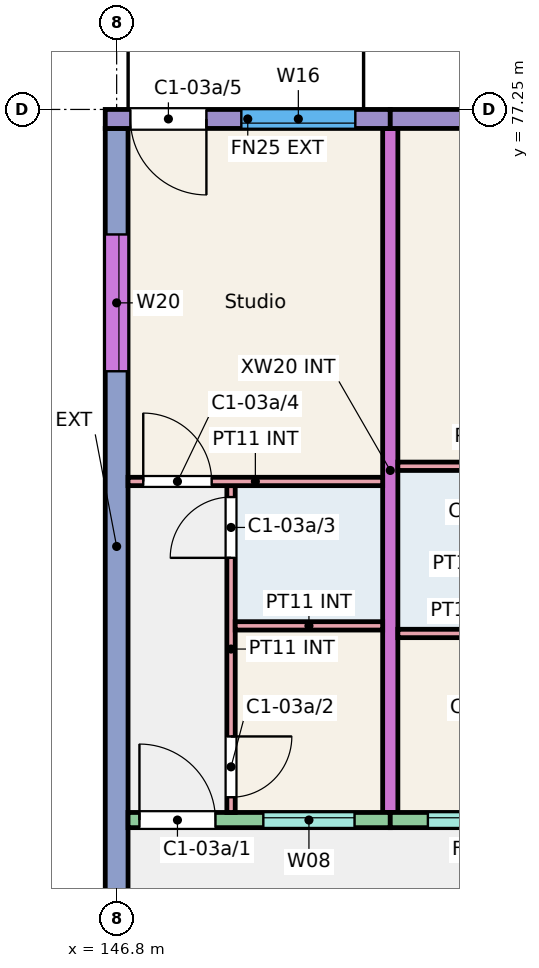
"""IFC4 building model, lengths in metres.
Left out: names, types, materials, properties, quantities, classifications, styles, units other than length and angle.
Written with IfcOpenShell. Run it as: python <this file> out.ifc"""

import sys

from ifc_helpers import new_model, si_unit, direction, frame, frame_2d, origin, place, context, subcontext, project, spatial, rectangle, extrude, element, fill, save


model = new_model("IFC4")
c1 = context("Model", 3, precision=1e-05, world=origin(), true_north=direction((0.0, 1.0)))
c2 = subcontext(c1, "Body", "Model", "MODEL_VIEW")
j1 = project(units=[si_unit("LENGTHUNIT", "METRE"), si_unit("PLANEANGLEUNIT", "RADIAN")], contexts=[c1])
p1 = place(None, origin())
s1 = spatial("IfcSite", under=j1, at=p1, CompositionType="ELEMENT")
p2 = place(p1, origin())
s2 = spatial("IfcBuilding", under=s1, at=p2, CompositionType="ELEMENT")
p3 = place(p2, frame((0.0, 0.0, 9.0)))
s3 = spatial("IfcBuildingStorey", under=s2, at=p3, CompositionType="ELEMENT", Elevation=9.0)
p4 = place(p3, frame((146.8, 66.0, 0.0), z_axis=(0.0, 0.0, 1.0), x_axis=(0.0, 1.0, 0.0)))
e1 = element("IfcWall", 1, at=p4, inside=s3, PredefinedType="SHEAR", context=c2, shape_type="SweptSolid", body=[
    extrude(rectangle(XDim=11.0, YDim=0.3, at=frame_2d((5.5, 0.0))), origin(), (0.0, 0.0, 1.0), 3.0),
])
p5 = place(p4, frame((7.805, 0.0, 0.9)))
e2 = element("IfcOpeningElement", 2, at=p5, cuts=e1, PredefinedType="OPENING", context=c2, shape_type="SweptSolid", body=[
    extrude(rectangle(XDim=1.8, YDim=1.5, at=frame_2d((0.9, 0.75))), frame((0.0, 0.16, 0.0), z_axis=(0.0, -1.0, 0.0), x_axis=(1.0, 0.0, 0.0)), (0.0, 0.0, 1.0), 0.32),
])
p6 = place(p3, frame((150.4, 68.0, 0.0), z_axis=(0.0, 0.0, 1.0), x_axis=(0.0, 1.0, 0.0)))
e3 = element("IfcWall", 3, at=p6, inside=s3, PredefinedType="SHEAR", context=c2, shape_type="SweptSolid", body=[
    extrude(rectangle(XDim=9.0, YDim=0.2, at=frame_2d((4.5, 0.0))), origin(), (0.0, 0.0, 1.0), 3.0),
])
p7 = place(p3, frame((146.65, 77.125, 0.0), z_axis=(0.0, 0.0, 1.0), x_axis=(1.0, 0.0, 0.0)))
e4 = element("IfcWall", 4, at=p7, inside=s3, PredefinedType="SOLIDWALL", context=c2, shape_type="SweptSolid", body=[
    extrude(rectangle(XDim=3.75, YDim=0.25, at=frame_2d((1.875, 0.0))), origin(), (0.0, 0.0, 1.0), 3.0),
])
p8 = place(p7, frame((1.791, 0.0, 0.9)))
e5 = element("IfcOpeningElement", 5, at=p8, cuts=e4, PredefinedType="OPENING", context=c2, shape_type="SweptSolid", body=[
    extrude(rectangle(XDim=1.5, YDim=1.5, at=frame_2d((0.75, 0.75))), frame((0.0, 0.135, 0.0), z_axis=(0.0, -1.0, 0.0), x_axis=(1.0, 0.0, 0.0)), (0.0, 0.0, 1.0), 0.27),
])
p9 = place(p7, frame((0.331, 0.0, 0.0)))
e6 = element("IfcOpeningElement", 6, at=p9, cuts=e4, PredefinedType="OPENING", context=c2, shape_type="SweptSolid", body=[
    extrude(rectangle(XDim=1.0, YDim=2.1, at=frame_2d((0.5, 1.05))), frame((0.0, 0.135, 0.0), z_axis=(0.0, -1.0, 0.0), x_axis=(1.0, 0.0, 0.0)), (0.0, 0.0, 1.0), 0.27),
])
p10 = place(p3, frame((146.95, 67.9, 0.0), z_axis=(0.0, 0.0, 1.0), x_axis=(1.0, 0.0, 0.0)))
e7 = element("IfcWall", 7, at=p10, inside=s3, PredefinedType="SOLIDWALL", context=c2, shape_type="SweptSolid", body=[
    extrude(rectangle(XDim=3.45, YDim=0.2, at=frame_2d((1.725, 0.0))), origin(), (0.0, 0.0, 1.0), 3.0),
])
p11 = place(p10, frame((1.78, 0.0, 1.1)))
e8 = element("IfcOpeningElement", 8, at=p11, cuts=e7, PredefinedType="OPENING", context=c2, shape_type="SweptSolid", body=[
    extrude(rectangle(XDim=1.2, YDim=1.3, at=frame_2d((0.6, 0.65))), frame((0.0, 0.11, 0.0), z_axis=(0.0, -1.0, 0.0), x_axis=(1.0, 0.0, 0.0)), (0.0, 0.0, 1.0), 0.22),
])
p12 = place(p10, frame((0.15, 0.0, 0.0)))
e9 = element("IfcOpeningElement", 9, at=p12, cuts=e7, PredefinedType="OPENING", context=c2, shape_type="SweptSolid", body=[
    extrude(rectangle(XDim=1.0, YDim=2.1, at=frame_2d((0.5, 1.05))), frame((0.0, 0.11, 0.0), z_axis=(0.0, -1.0, 0.0), x_axis=(1.0, 0.0, 0.0)), (0.0, 0.0, 1.0), 0.22),
])
p13 = place(p3, frame((150.4, 77.125, 0.0), z_axis=(0.0, 0.0, 1.0), x_axis=(1.0, 0.0, 0.0)))
e10 = element("IfcWall", 10, at=p13, inside=s3, PredefinedType="SOLIDWALL", context=c2, shape_type="SweptSolid", body=[
    extrude(rectangle(XDim=3.6, YDim=0.25, at=frame_2d((1.8, 0.0))), origin(), (0.0, 0.0, 1.0), 3.0),
])
p14 = place(p13, frame((1.05, 0.0, 0.9)))
e11 = element("IfcOpeningElement", 11, at=p14, cuts=e10, PredefinedType="OPENING", context=c2, shape_type="SweptSolid", body=[
    extrude(rectangle(XDim=1.5, YDim=1.5, at=frame_2d((0.75, 0.75))), frame((0.0, 0.135, 0.0), z_axis=(0.0, -1.0, 0.0), x_axis=(1.0, 0.0, 0.0)), (0.0, 0.0, 1.0), 0.27),
])
p15 = place(p3, frame((150.4, 67.9, 0.0), z_axis=(0.0, 0.0, 1.0), x_axis=(1.0, 0.0, 0.0)))
e12 = element("IfcWall", 12, at=p15, inside=s3, PredefinedType="SOLIDWALL", context=c2, shape_type="SweptSolid", body=[
    extrude(rectangle(XDim=3.6, YDim=0.2, at=frame_2d((1.8, 0.0))), origin(), (0.0, 0.0, 1.0), 3.0),
])
p16 = place(p15, frame((0.495, 0.0, 1.1)))
e13 = element("IfcOpeningElement", 13, at=p16, cuts=e12, PredefinedType="OPENING", context=c2, shape_type="SweptSolid", body=[
    extrude(rectangle(XDim=1.2, YDim=1.3, at=frame_2d((0.6, 0.65))), frame((0.0, 0.11, 0.0), z_axis=(0.0, -1.0, 0.0), x_axis=(1.0, 0.0, 0.0)), (0.0, 0.0, 1.0), 0.22),
])
p17 = place(p15, frame((2.35, 0.0, 0.0)))
e14 = element("IfcOpeningElement", 14, at=p17, cuts=e12, PredefinedType="OPENING", context=c2, shape_type="SweptSolid", body=[
    extrude(rectangle(XDim=1.0, YDim=2.1, at=frame_2d((0.5, 1.05))), frame((0.0, 0.11, 0.0), z_axis=(0.0, -1.0, 0.0), x_axis=(1.0, 0.0, 0.0)), (0.0, 0.0, 1.0), 0.22),
])
p18 = place(p3, frame((148.305, 68.0, 0.0), z_axis=(0.0, 0.0, 1.0), x_axis=(0.0, 1.0, 0.0)))
e15 = element("IfcWall", 15, at=p18, inside=s3, PredefinedType="PARTITIONING", context=c2, shape_type="SweptSolid", body=[
    extrude(rectangle(XDim=4.3, YDim=0.11, at=frame_2d((2.15, 0.0))), origin(), (0.0, 0.0, 1.0), 2.8),
])
p19 = place(p18, frame((0.2, 0.0, 0.0)))
e16 = element("IfcOpeningElement", 16, at=p19, cuts=e15, PredefinedType="OPENING", context=c2, shape_type="SweptSolid", body=[
    extrude(rectangle(XDim=0.8, YDim=2.1, at=frame_2d((0.4, 1.05))), frame((0.0, 0.065, 0.0), z_axis=(0.0, -1.0, 0.0), x_axis=(1.0, 0.0, 0.0)), (0.0, 0.0, 1.0), 0.13),
])
p20 = place(p18, frame((3.35, 0.0, 0.0)))
e17 = element("IfcOpeningElement", 17, at=p20, cuts=e15, PredefinedType="OPENING", context=c2, shape_type="SweptSolid", body=[
    extrude(rectangle(XDim=0.8, YDim=2.1, at=frame_2d((0.4, 1.05))), frame((0.0, 0.065, 0.0), z_axis=(0.0, -1.0, 0.0), x_axis=(1.0, 0.0, 0.0)), (0.0, 0.0, 1.0), 0.13),
])
p21 = place(p3, frame((148.36, 70.455, 0.0), z_axis=(0.0, 0.0, 1.0), x_axis=(1.0, 0.0, 0.0)))
e18 = element("IfcWall", 18, at=p21, inside=s3, PredefinedType="PARTITIONING", context=c2, shape_type="SweptSolid", body=[
    extrude(rectangle(XDim=1.94, YDim=0.11, at=frame_2d((0.97, 0.0))), origin(), (0.0, 0.0, 1.0), 2.8),
])
p22 = place(p3, frame((146.95, 72.355, 0.0), z_axis=(0.0, 0.0, 1.0), x_axis=(1.0, 0.0, 0.0)))
e19 = element("IfcWall", 19, at=p22, inside=s3, PredefinedType="PARTITIONING", context=c2, shape_type="SweptSolid", body=[
    extrude(rectangle(XDim=3.35, YDim=0.11, at=frame_2d((1.675, 0.0))), origin(), (0.0, 0.0, 1.0), 2.8),
])
p23 = place(p22, frame((0.2, 0.0, 0.0)))
e20 = element("IfcOpeningElement", 20, at=p23, cuts=e19, PredefinedType="OPENING", context=c2, shape_type="SweptSolid", body=[
    extrude(rectangle(XDim=0.9, YDim=2.1, at=frame_2d((0.45, 1.05))), frame((0.0, 0.065, 0.0), z_axis=(0.0, -1.0, 0.0), x_axis=(1.0, 0.0, 0.0)), (0.0, 0.0, 1.0), 0.13),
])
p24 = place(p3, frame((150.5, 70.355, 0.0), z_axis=(0.0, 0.0, 1.0), x_axis=(1.0, 0.0, 0.0)))
e21 = element("IfcWall", 21, at=p24, inside=s3, PredefinedType="PARTITIONING", context=c2, shape_type="SweptSolid", body=[
    extrude(rectangle(XDim=1.99, YDim=0.11, at=frame_2d((0.995, 0.0))), origin(), (0.0, 0.0, 1.0), 2.8),
])
p25 = place(p3, frame((150.5, 72.555, 0.0), z_axis=(0.0, 0.0, 1.0), x_axis=(1.0, 0.0, 0.0)))
e22 = element("IfcWall", 22, at=p25, inside=s3, PredefinedType="PARTITIONING", context=c2, shape_type="SweptSolid", body=[
    extrude(rectangle(XDim=3.4, YDim=0.11, at=frame_2d((1.7, 0.0))), origin(), (0.0, 0.0, 1.0), 2.8),
])
p26 = place(p25, frame((2.3, 0.0, 0.0)))
e23 = element("IfcOpeningElement", 23, at=p26, cuts=e22, PredefinedType="OPENING", context=c2, shape_type="SweptSolid", body=[
    extrude(rectangle(XDim=0.9, YDim=2.1, at=frame_2d((0.45, 1.05))), frame((0.0, 0.065, 0.0), z_axis=(0.0, -1.0, 0.0), x_axis=(1.0, 0.0, 0.0)), (0.0, 0.0, 1.0), 0.13),
])
p27 = place(p11, origin())
e24 = element("IfcWindow", 24, at=p27, inside=s3, PartitioningType="SINGLE_PANEL", PredefinedType="WINDOW", context=c2, shape_type="SweptSolid", body=[
    extrude(rectangle(XDim=1.2, YDim=1.3, at=frame_2d((0.6, 0.65))), frame((0.0, 0.06, 0.0), z_axis=(0.0, -1.0, 0.0), x_axis=(1.0, 0.0, 0.0)), (0.0, 0.0, 1.0), 0.06),
])
fill(e8, e24)
p28 = place(p8, origin())
e25 = element("IfcWindow", 25, at=p28, inside=s3, PartitioningType="SINGLE_PANEL", PredefinedType="WINDOW", context=c2, shape_type="SweptSolid", body=[
    extrude(rectangle(XDim=1.5, YDim=1.5, at=frame_2d((0.75, 0.75))), frame((0.0, -0.025, 0.0), z_axis=(0.0, -1.0, 0.0), x_axis=(1.0, 0.0, 0.0)), (0.0, 0.0, 1.0), 0.06),
])
fill(e5, e25)
p29 = place(p5, origin())
e26 = element("IfcWindow", 26, at=p29, inside=s3, PartitioningType="SINGLE_PANEL", PredefinedType="WINDOW", context=c2, shape_type="SweptSolid", body=[
    extrude(rectangle(XDim=1.8, YDim=1.5, at=frame_2d((0.9, 0.75))), frame((0.0, 0.0, 0.0), z_axis=(0.0, -1.0, 0.0), x_axis=(1.0, 0.0, 0.0)), (0.0, 0.0, 1.0), 0.06),
])
fill(e2, e26)
p30 = place(p16, origin())
e27 = element("IfcWindow", 27, at=p30, inside=s3, PartitioningType="SINGLE_PANEL", PredefinedType="WINDOW", context=c2, shape_type="SweptSolid", body=[
    extrude(rectangle(XDim=1.2, YDim=1.3, at=frame_2d((0.6, 0.65))), frame((0.0, 0.06, 0.0), z_axis=(0.0, -1.0, 0.0), x_axis=(1.0, 0.0, 0.0)), (0.0, 0.0, 1.0), 0.06),
])
fill(e13, e27)
p31 = place(p12, origin())
e28 = element("IfcDoor", 28, at=p31, inside=s3, OperationType="SINGLE_SWING_LEFT", PredefinedType="DOOR", context=c2, shape_type="SweptSolid", body=[
    extrude(rectangle(XDim=1.0, YDim=2.1, at=frame_2d((0.5, 1.05))), frame((0.0, 0.025, 0.0), z_axis=(0.0, -1.0, 0.0), x_axis=(1.0, 0.0, 0.0)), (0.0, 0.0, 1.0), 0.05),
])
fill(e9, e28)
p32 = place(p19, origin())
e29 = element("IfcDoor", 29, at=p32, inside=s3, OperationType="SINGLE_SWING_RIGHT", PredefinedType="DOOR", context=c2, shape_type="SweptSolid", body=[
    extrude(rectangle(XDim=0.8, YDim=2.1, at=frame_2d((0.4, 1.05))), frame((0.0, 0.025, 0.0), z_axis=(0.0, -1.0, 0.0), x_axis=(1.0, 0.0, 0.0)), (0.0, 0.0, 1.0), 0.05),
])
fill(e16, e29)
p33 = place(p20, origin())
e30 = element("IfcDoor", 30, at=p33, inside=s3, OperationType="SINGLE_SWING_LEFT", PredefinedType="DOOR", context=c2, shape_type="SweptSolid", body=[
    extrude(rectangle(XDim=0.8, YDim=2.1, at=frame_2d((0.4, 1.05))), frame((0.0, 0.025, 0.0), z_axis=(0.0, -1.0, 0.0), x_axis=(1.0, 0.0, 0.0)), (0.0, 0.0, 1.0), 0.05),
])
fill(e17, e30)
p34 = place(p23, origin())
e31 = element("IfcDoor", 31, at=p34, inside=s3, OperationType="SINGLE_SWING_LEFT", PredefinedType="DOOR", context=c2, shape_type="SweptSolid", body=[
    extrude(rectangle(XDim=0.9, YDim=2.1, at=frame_2d((0.45, 1.05))), frame((0.0, 0.025, 0.0), z_axis=(0.0, -1.0, 0.0), x_axis=(1.0, 0.0, 0.0)), (0.0, 0.0, 1.0), 0.05),
])
fill(e20, e31)
p35 = place(p9, origin())
e32 = element("IfcDoor", 32, at=p35, inside=s3, OperationType="SINGLE_SWING_RIGHT", PredefinedType="DOOR", context=c2, shape_type="SweptSolid", body=[
    extrude(rectangle(XDim=1.0, YDim=2.1, at=frame_2d((0.5, 1.05))), frame((0.0, 0.025, 0.0), z_axis=(0.0, -1.0, 0.0), x_axis=(1.0, 0.0, 0.0)), (0.0, 0.0, 1.0), 0.05),
])
fill(e6, e32)
save(model, sys.argv[1])
